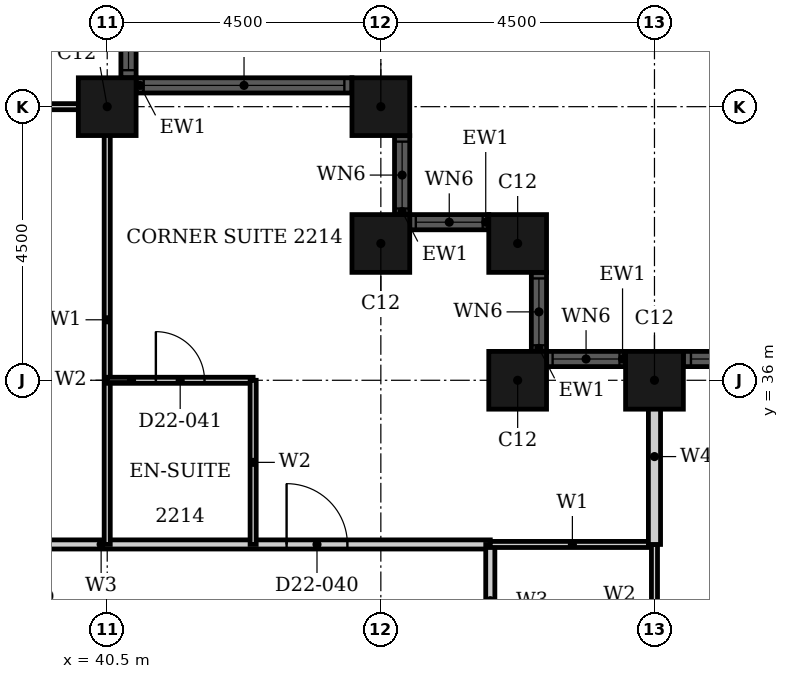
"""IFC4 building model, lengths in metres.
Left out: names, types, materials, properties, quantities, classifications, styles, units other than length and angle.
Written with IfcOpenShell. Run it as: python <this file> out.ifc"""

import sys

from ifc_helpers import new_model, si_unit, direction, frame, frame_2d, origin, origin_2d, place, context, subcontext, project, spatial, rectangle, hollow_rectangle, extrude, element, fill, save


model = new_model("IFC4")
c1 = context("Model", 3, precision=1e-05, world=origin(), true_north=direction((0.0, 1.0)))
c2 = subcontext(c1, "Body", "Model", "MODEL_VIEW")
j1 = project(units=[si_unit("LENGTHUNIT", "METRE"), si_unit("PLANEANGLEUNIT", "RADIAN")], contexts=[c1])
p1 = place(None, origin())
s1 = spatial("IfcSite", under=j1, at=p1, CompositionType="ELEMENT")
p2 = place(p1, origin())
s2 = spatial("IfcBuilding", under=s1, at=p2, CompositionType="ELEMENT")
p3 = place(p2, frame((0.0, 0.0, 92.4)))
s3 = spatial("IfcBuildingStorey", under=s2, at=p3, CompositionType="ELEMENT", Elevation=92.4)
for number, where, z_axis, x_axis in (
    (1, (49.5, 36.0, 0.0), (0.0, 0.0, 1.0), (1.0, 0.0, 0.0)),
    (2, (47.25, 36.0, 0.0), (0.0, 0.0, 1.0), (1.0, 0.0, 0.0)),
    (3, (47.25, 38.25, 0.0), (0.0, 0.0, 1.0), (1.0, 0.0, 0.0)),
    (4, (45.0, 38.25, 0.0), (0.0, 0.0, 1.0), (1.0, 0.0, 0.0)),
    (5, (45.0, 40.5, 0.0), (0.0, 0.0, 1.0), (1.0, 0.0, 0.0)),
    (6, (40.5, 40.5, 0.0), (0.0, 0.0, 1.0), (1.0, 0.0, 0.0)),
):
    element("IfcColumn", number, at=place(p3, frame(where, z_axis=z_axis, x_axis=x_axis)), inside=s3, PredefinedType="COLUMN", context=c2, shape_type="SweptSolid", body=[
        extrude(hollow_rectangle(XDim=0.95, YDim=0.95, WallThickness=0.03, at=origin_2d()), origin(), (0.0, 0.0, 1.0), 3.6),
    ])
p4 = place(p3, frame((58.025, 36.35, 0.0), z_axis=(0.0, 0.0, 1.0), x_axis=(-1.0, 0.0, 0.0)))
e7 = element("IfcWall", 7, at=p4, inside=s3, PredefinedType="SOLIDWALL", context=c2, shape_type="SweptSolid", body=[
    extrude(rectangle(XDim=8.05, YDim=0.25, at=frame_2d((4.025, 0.0))), origin(), (0.0, 0.0, 1.0), 3.6),
])
p5 = place(p4, frame((0.125, 0.0, 0.9)))
e8 = element("IfcOpeningElement", 8, at=p5, cuts=e7, PredefinedType="OPENING", context=c2, shape_type="SweptSolid", body=[
    extrude(rectangle(XDim=3.3, YDim=1.85, at=frame_2d((1.65, 0.925))), frame((0.0, 0.135, 0.0), z_axis=(0.0, -1.0, 0.0), x_axis=(1.0, 0.0, 0.0)), (0.0, 0.0, 1.0), 0.27),
])
p6 = place(p4, frame((4.625, 0.0, 0.9)))
e9 = element("IfcOpeningElement", 9, at=p6, cuts=e7, PredefinedType="OPENING", context=c2, shape_type="SweptSolid", body=[
    extrude(rectangle(XDim=3.3, YDim=1.85, at=frame_2d((1.65, 0.925))), frame((0.0, 0.135, 0.0), z_axis=(0.0, -1.0, 0.0), x_axis=(1.0, 0.0, 0.0)), (0.0, 0.0, 1.0), 0.27),
])
p7 = place(p3, frame((49.025, 36.35, 0.0), z_axis=(0.0, 0.0, 1.0), x_axis=(-1.0, 0.0, 0.0)))
e10 = element("IfcWall", 10, at=p7, inside=s3, PredefinedType="SOLIDWALL", context=c2, shape_type="SweptSolid", body=[
    extrude(rectangle(XDim=1.3, YDim=0.25, at=frame_2d((0.65, 0.0))), origin(), (0.0, 0.0, 1.0), 3.6),
])
p8 = place(p7, frame((0.1, 0.0, 0.9)))
e11 = element("IfcOpeningElement", 11, at=p8, cuts=e10, PredefinedType="OPENING", context=c2, shape_type="SweptSolid", body=[
    extrude(rectangle(XDim=1.1, YDim=1.85, at=frame_2d((0.55, 0.925))), frame((0.0, 0.135, 0.0), z_axis=(0.0, -1.0, 0.0), x_axis=(1.0, 0.0, 0.0)), (0.0, 0.0, 1.0), 0.27),
])
p9 = place(p3, frame((47.6, 36.475, 0.0), z_axis=(0.0, 0.0, 1.0), x_axis=(0.0, 1.0, 0.0)))
e12 = element("IfcWall", 12, at=p9, inside=s3, PredefinedType="SOLIDWALL", context=c2, shape_type="SweptSolid", body=[
    extrude(rectangle(XDim=1.3, YDim=0.25, at=frame_2d((0.65, 0.0))), origin(), (0.0, 0.0, 1.0), 3.6),
])
p10 = place(p9, frame((0.1, 0.0, 0.9)))
e13 = element("IfcOpeningElement", 13, at=p10, cuts=e12, PredefinedType="OPENING", context=c2, shape_type="SweptSolid", body=[
    extrude(rectangle(XDim=1.1, YDim=1.85, at=frame_2d((0.55, 0.925))), frame((0.0, 0.135, 0.0), z_axis=(0.0, -1.0, 0.0), x_axis=(1.0, 0.0, 0.0)), (0.0, 0.0, 1.0), 0.27),
])
p11 = place(p3, frame((46.775, 38.6, 0.0), z_axis=(0.0, 0.0, 1.0), x_axis=(-1.0, 0.0, 0.0)))
e14 = element("IfcWall", 14, at=p11, inside=s3, PredefinedType="SOLIDWALL", context=c2, shape_type="SweptSolid", body=[
    extrude(rectangle(XDim=1.3, YDim=0.25, at=frame_2d((0.65, 0.0))), origin(), (0.0, 0.0, 1.0), 3.6),
])
p12 = place(p11, frame((0.1, 0.0, 0.9)))
e15 = element("IfcOpeningElement", 15, at=p12, cuts=e14, PredefinedType="OPENING", context=c2, shape_type="SweptSolid", body=[
    extrude(rectangle(XDim=1.1, YDim=1.85, at=frame_2d((0.55, 0.925))), frame((0.0, 0.135, 0.0), z_axis=(0.0, -1.0, 0.0), x_axis=(1.0, 0.0, 0.0)), (0.0, 0.0, 1.0), 0.27),
])
p13 = place(p3, frame((45.35, 38.725, 0.0), z_axis=(0.0, 0.0, 1.0), x_axis=(0.0, 1.0, 0.0)))
e16 = element("IfcWall", 16, at=p13, inside=s3, PredefinedType="SOLIDWALL", context=c2, shape_type="SweptSolid", body=[
    extrude(rectangle(XDim=1.3, YDim=0.25, at=frame_2d((0.65, 0.0))), origin(), (0.0, 0.0, 1.0), 3.6),
])
p14 = place(p13, frame((0.1, 0.0, 0.9)))
e17 = element("IfcOpeningElement", 17, at=p14, cuts=e16, PredefinedType="OPENING", context=c2, shape_type="SweptSolid", body=[
    extrude(rectangle(XDim=1.1, YDim=1.85, at=frame_2d((0.55, 0.925))), frame((0.0, 0.135, 0.0), z_axis=(0.0, -1.0, 0.0), x_axis=(1.0, 0.0, 0.0)), (0.0, 0.0, 1.0), 0.27),
])
p15 = place(p3, frame((44.525, 40.85, 0.0), z_axis=(0.0, 0.0, 1.0), x_axis=(-1.0, 0.0, 0.0)))
e18 = element("IfcWall", 18, at=p15, inside=s3, PredefinedType="SOLIDWALL", context=c2, shape_type="SweptSolid", body=[
    extrude(rectangle(XDim=3.55, YDim=0.25, at=frame_2d((1.775, 0.0))), origin(), (0.0, 0.0, 1.0), 3.6),
])
p16 = place(p15, frame((0.125, 0.0, 0.9)))
e19 = element("IfcOpeningElement", 19, at=p16, cuts=e18, PredefinedType="OPENING", context=c2, shape_type="SweptSolid", body=[
    extrude(rectangle(XDim=3.3, YDim=1.85, at=frame_2d((1.65, 0.925))), frame((0.0, 0.135, 0.0), z_axis=(0.0, -1.0, 0.0), x_axis=(1.0, 0.0, 0.0)), (0.0, 0.0, 1.0), 0.27),
])
p17 = place(p3, frame((40.85, 40.975, 0.0), z_axis=(0.0, 0.0, 1.0), x_axis=(0.0, 1.0, 0.0)))
e20 = element("IfcWall", 20, at=p17, inside=s3, PredefinedType="SOLIDWALL", context=c2, shape_type="SweptSolid", body=[
    extrude(rectangle(XDim=8.05, YDim=0.25, at=frame_2d((4.025, 0.0))), origin(), (0.0, 0.0, 1.0), 3.6),
])
p18 = place(p17, frame((0.125, 0.0, 0.9)))
e21 = element("IfcOpeningElement", 21, at=p18, cuts=e20, PredefinedType="OPENING", context=c2, shape_type="SweptSolid", body=[
    extrude(rectangle(XDim=3.3, YDim=1.85, at=frame_2d((1.65, 0.925))), frame((0.0, 0.135, 0.0), z_axis=(0.0, -1.0, 0.0), x_axis=(1.0, 0.0, 0.0)), (0.0, 0.0, 1.0), 0.27),
])
p19 = place(p17, frame((4.625, 0.0, 0.9)))
e22 = element("IfcOpeningElement", 22, at=p19, cuts=e20, PredefinedType="OPENING", context=c2, shape_type="SweptSolid", body=[
    extrude(rectangle(XDim=3.3, YDim=1.85, at=frame_2d((1.65, 0.925))), frame((0.0, 0.135, 0.0), z_axis=(0.0, -1.0, 0.0), x_axis=(1.0, 0.0, 0.0)), (0.0, 0.0, 1.0), 0.27),
])
p20 = place(p3, frame((33.3, 33.3, 0.0), z_axis=(0.0, 0.0, 1.0), x_axis=(1.0, 0.0, 0.0)))
e23 = element("IfcWall", 23, at=p20, inside=s3, PredefinedType="PARTITIONING", context=c2, shape_type="SweptSolid", body=[
    extrude(rectangle(XDim=13.5, YDim=0.15, at=frame_2d((6.75, 0.0))), origin(), (0.0, 0.0, 1.0), 3.2),
])
p21 = place(p20, frame((10.15, 0.0, 0.0)))
e24 = element("IfcOpeningElement", 24, at=p21, cuts=e23, PredefinedType="OPENING", context=c2, shape_type="SweptSolid", body=[
    extrude(rectangle(XDim=1.0, YDim=2.1, at=frame_2d((0.5, 1.05))), frame((0.0, 0.085, 0.0), z_axis=(0.0, -1.0, 0.0), x_axis=(1.0, 0.0, 0.0)), (0.0, 0.0, 1.0), 0.17),
])
p22 = place(p20, frame((3.15, 0.0, 0.0)))
e25 = element("IfcOpeningElement", 25, at=p22, cuts=e23, PredefinedType="OPENING", context=c2, shape_type="SweptSolid", body=[
    extrude(rectangle(XDim=0.9, YDim=2.1, at=frame_2d((0.45, 1.05))), frame((0.0, 0.085, 0.0), z_axis=(0.0, -1.0, 0.0), x_axis=(1.0, 0.0, 0.0)), (0.0, 0.0, 1.0), 0.17),
])
p23 = place(p3, frame((46.8, 28.8, 0.0), z_axis=(0.0, 0.0, 1.0), x_axis=(0.0, 1.0, 0.0)))
e26 = element("IfcWall", 26, at=p23, inside=s3, PredefinedType="PARTITIONING", context=c2, shape_type="SweptSolid", body=[
    extrude(rectangle(XDim=4.5, YDim=0.15, at=frame_2d((2.25, 0.0))), origin(), (0.0, 0.0, 1.0), 3.2),
])
p24 = place(p23, frame((1.75, 0.0, 0.0)))
e27 = element("IfcOpeningElement", 27, at=p24, cuts=e26, PredefinedType="OPENING", context=c2, shape_type="SweptSolid", body=[
    extrude(rectangle(XDim=0.9, YDim=2.1, at=frame_2d((0.45, 1.05))), frame((0.0, 0.085, 0.0), z_axis=(0.0, -1.0, 0.0), x_axis=(1.0, 0.0, 0.0)), (0.0, 0.0, 1.0), 0.17),
])
p25 = place(p3, frame((46.8, 33.3, 0.0), z_axis=(0.0, 0.0, 1.0), x_axis=(1.0, 0.0, 0.0)))
e28 = element("IfcWall", 28, at=p25, inside=s3, PredefinedType="PARTITIONING", context=c2, shape_type="SweptSolid", body=[
    extrude(rectangle(XDim=2.7, YDim=0.1, at=frame_2d((1.35, 0.0))), origin(), (0.0, 0.0, 1.0), 3.2),
])
p26 = place(p3, frame((33.3, 40.5, 0.0), z_axis=(0.0, 0.0, 1.0), x_axis=(1.0, 0.0, 0.0)))
e29 = element("IfcWall", 29, at=p26, inside=s3, PredefinedType="PARTITIONING", context=c2, shape_type="SweptSolid", body=[
    extrude(rectangle(XDim=7.39, YDim=0.1, at=frame_2d((3.695, 0.0))), origin(), (0.0, 0.0, 1.0), 2.28),
])
p27 = place(p3, frame((40.5, 33.3, 0.0), z_axis=(0.0, 0.0, 1.0), x_axis=(0.0, 1.0, 0.0)))
e30 = element("IfcWall", 30, at=p27, inside=s3, PredefinedType="PARTITIONING", context=c2, shape_type="SweptSolid", body=[
    extrude(rectangle(XDim=7.39, YDim=0.1, at=frame_2d((3.695, 0.0))), origin(), (0.0, 0.0, 1.0), 3.2),
])
p28 = place(p3, frame((49.5, 28.8, 0.0), z_axis=(0.0, 0.0, 1.0), x_axis=(0.0, 1.0, 0.0)))
e31 = element("IfcWall", 31, at=p28, inside=s3, PredefinedType="PARTITIONING", context=c2, shape_type="SweptSolid", body=[
    extrude(rectangle(XDim=4.5, YDim=0.1, at=frame_2d((2.25, 0.0))), origin(), (0.0, 0.0, 1.0), 2.28),
])
p29 = place(p3, frame((49.5, 33.3, 0.0), z_axis=(0.0, 0.0, 1.0), x_axis=(0.0, 1.0, 0.0)))
e32 = element("IfcWall", 32, at=p29, inside=s3, PredefinedType="PARTITIONING", context=c2, shape_type="SweptSolid", body=[
    extrude(rectangle(XDim=2.89, YDim=0.2, at=frame_2d((1.445, 0.0))), origin(), (0.0, 0.0, 1.0), 2.28),
])
p30 = place(p3, frame((40.5, 36.0, 0.0), z_axis=(0.0, 0.0, 1.0), x_axis=(1.0, 0.0, 0.0)))
e33 = element("IfcWall", 33, at=p30, inside=s3, PredefinedType="PARTITIONING", context=c2, shape_type="SweptSolid", body=[
    extrude(rectangle(XDim=2.4, YDim=0.1, at=frame_2d((1.2, 0.0))), origin(), (0.0, 0.0, 1.0), 3.2),
])
p31 = place(p30, frame((0.8, 0.0, 0.0)))
e34 = element("IfcOpeningElement", 34, at=p31, cuts=e33, PredefinedType="OPENING", context=c2, shape_type="SweptSolid", body=[
    extrude(rectangle(XDim=0.8, YDim=2.1, at=frame_2d((0.4, 1.05))), frame((0.0, 0.06, 0.0), z_axis=(0.0, -1.0, 0.0), x_axis=(1.0, 0.0, 0.0)), (0.0, 0.0, 1.0), 0.12),
])
p32 = place(p3, frame((42.9, 33.3, 0.0), z_axis=(0.0, 0.0, 1.0), x_axis=(0.0, 1.0, 0.0)))
e35 = element("IfcWall", 35, at=p32, inside=s3, PredefinedType="PARTITIONING", context=c2, shape_type="SweptSolid", body=[
    extrude(rectangle(XDim=2.7, YDim=0.1, at=frame_2d((1.35, 0.0))), origin(), (0.0, 0.0, 1.0), 3.2),
])
p33 = place(p6, origin())
e36 = element("IfcWindow", 36, at=p33, inside=s3, PartitioningType="SINGLE_PANEL", PredefinedType="WINDOW", context=c2, shape_type="SweptSolid", body=[
    extrude(rectangle(XDim=3.3, YDim=1.85, at=frame_2d((1.65, 0.925))), frame((0.0, 0.03, 0.0), z_axis=(0.0, -1.0, 0.0), x_axis=(1.0, 0.0, 0.0)), (0.0, 0.0, 1.0), 0.06),
])
fill(e9, e36)
p34 = place(p8, origin())
e37 = element("IfcWindow", 37, at=p34, inside=s3, PartitioningType="SINGLE_PANEL", PredefinedType="WINDOW", context=c2, shape_type="SweptSolid", body=[
    extrude(rectangle(XDim=1.1, YDim=1.85, at=frame_2d((0.55, 0.925))), frame((0.0, 0.03, 0.0), z_axis=(0.0, -1.0, 0.0), x_axis=(1.0, 0.0, 0.0)), (0.0, 0.0, 1.0), 0.06),
])
fill(e11, e37)
p35 = place(p10, origin())
e38 = element("IfcWindow", 38, at=p35, inside=s3, PartitioningType="SINGLE_PANEL", PredefinedType="WINDOW", context=c2, shape_type="SweptSolid", body=[
    extrude(rectangle(XDim=1.1, YDim=1.85, at=frame_2d((0.55, 0.925))), frame((0.0, 0.03, 0.0), z_axis=(0.0, -1.0, 0.0), x_axis=(1.0, 0.0, 0.0)), (0.0, 0.0, 1.0), 0.06),
])
fill(e13, e38)
p36 = place(p12, origin())
e39 = element("IfcWindow", 39, at=p36, inside=s3, PartitioningType="SINGLE_PANEL", PredefinedType="WINDOW", context=c2, shape_type="SweptSolid", body=[
    extrude(rectangle(XDim=1.1, YDim=1.85, at=frame_2d((0.55, 0.925))), frame((0.0, 0.03, 0.0), z_axis=(0.0, -1.0, 0.0), x_axis=(1.0, 0.0, 0.0)), (0.0, 0.0, 1.0), 0.06),
])
fill(e15, e39)
p37 = place(p14, origin())
e40 = element("IfcWindow", 40, at=p37, inside=s3, PartitioningType="SINGLE_PANEL", PredefinedType="WINDOW", context=c2, shape_type="SweptSolid", body=[
    extrude(rectangle(XDim=1.1, YDim=1.85, at=frame_2d((0.55, 0.925))), frame((0.0, 0.03, 0.0), z_axis=(0.0, -1.0, 0.0), x_axis=(1.0, 0.0, 0.0)), (0.0, 0.0, 1.0), 0.06),
])
fill(e17, e40)
p38 = place(p16, origin())
e41 = element("IfcWindow", 41, at=p38, inside=s3, PartitioningType="SINGLE_PANEL", PredefinedType="WINDOW", context=c2, shape_type="SweptSolid", body=[
    extrude(rectangle(XDim=3.3, YDim=1.85, at=frame_2d((1.65, 0.925))), frame((0.0, 0.03, 0.0), z_axis=(0.0, -1.0, 0.0), x_axis=(1.0, 0.0, 0.0)), (0.0, 0.0, 1.0), 0.06),
])
fill(e19, e41)
p39 = place(p18, origin())
e42 = element("IfcWindow", 42, at=p39, inside=s3, PartitioningType="SINGLE_PANEL", PredefinedType="WINDOW", context=c2, shape_type="SweptSolid", body=[
    extrude(rectangle(XDim=3.3, YDim=1.85, at=frame_2d((1.65, 0.925))), frame((0.0, 0.03, 0.0), z_axis=(0.0, -1.0, 0.0), x_axis=(1.0, 0.0, 0.0)), (0.0, 0.0, 1.0), 0.06),
])
fill(e21, e42)
p40 = place(p21, origin())
e43 = element("IfcDoor", 43, at=p40, inside=s3, OperationType="SINGLE_SWING_RIGHT", PredefinedType="DOOR", context=c2, shape_type="SweptSolid", body=[
    extrude(rectangle(XDim=1.0, YDim=2.1, at=frame_2d((0.5, 1.05))), frame((0.0, 0.025, 0.0), z_axis=(0.0, -1.0, 0.0), x_axis=(1.0, 0.0, 0.0)), (0.0, 0.0, 1.0), 0.05),
])
fill(e24, e43)
p41 = place(p31, origin())
e44 = element("IfcDoor", 44, at=p41, inside=s3, OperationType="SINGLE_SWING_LEFT", PredefinedType="DOOR", context=c2, shape_type="SweptSolid", body=[
    extrude(rectangle(XDim=0.8, YDim=2.1, at=frame_2d((0.4, 1.05))), frame((0.0, 0.025, 0.0), z_axis=(0.0, -1.0, 0.0), x_axis=(1.0, 0.0, 0.0)), (0.0, 0.0, 1.0), 0.05),
])
fill(e34, e44)
save(model, sys.argv[1])
